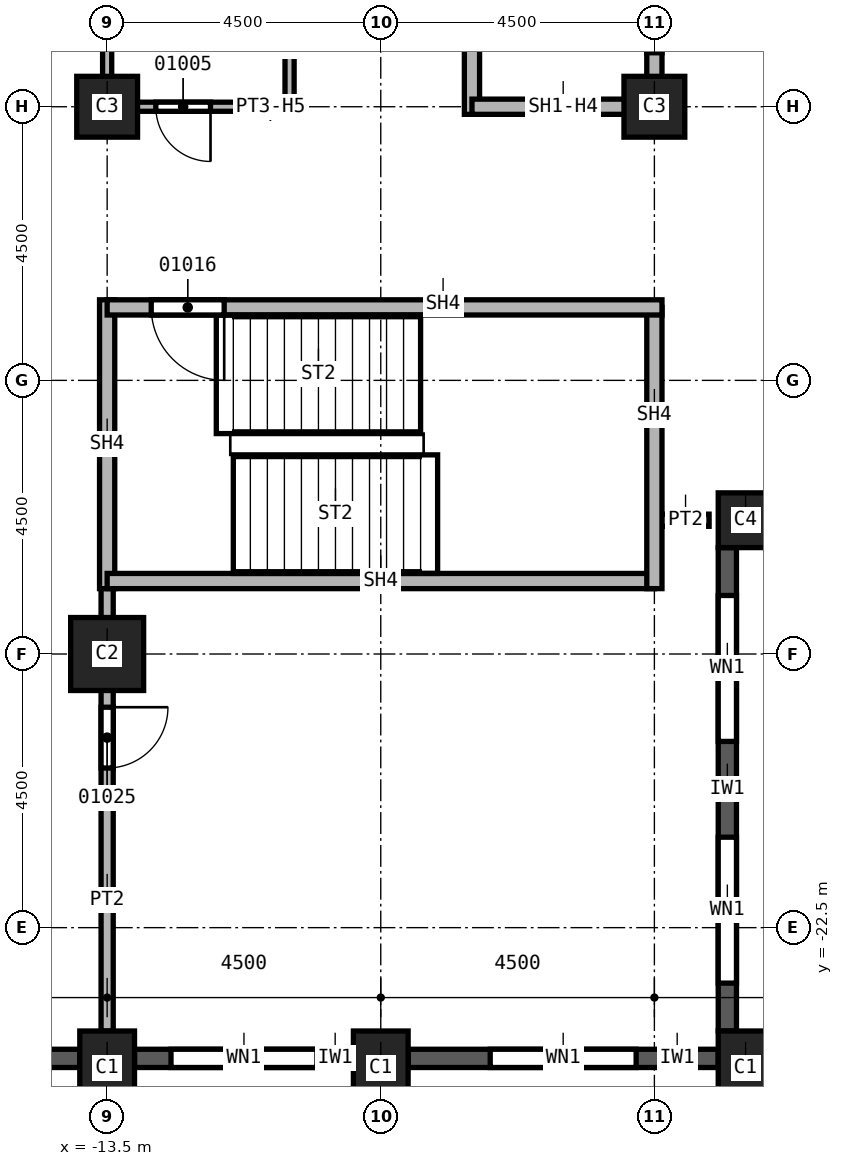
"""IFC4 building model, lengths in metres.
Left out: names, types, materials, properties, quantities, classifications, styles, units other than length and angle.
Written with IfcOpenShell. Run it as: python <this file> out.ifc"""

import sys

from ifc_helpers import new_model, si_unit, direction, frame, frame_2d, origin, origin_2d, place, context, subcontext, project, spatial, rectangle, extrude, element, fill, save


model = new_model("IFC4")
c1 = context("Model", 3, precision=1e-05, world=origin(), true_north=direction((0.0, 1.0)))
c2 = subcontext(c1, "Body", "Model", "MODEL_VIEW")
j1 = project(units=[si_unit("LENGTHUNIT", "METRE"), si_unit("PLANEANGLEUNIT", "RADIAN")], contexts=[c1])
p1 = place(None, origin())
s1 = spatial("IfcSite", under=j1, at=p1, CompositionType="ELEMENT")
p2 = place(p1, origin())
s2 = spatial("IfcBuilding", under=s1, at=p2, CompositionType="ELEMENT")
p3 = place(p2, frame((0.0, 0.0, 72.0)))
s3 = spatial("IfcBuildingStorey", under=s2, at=p3, CompositionType="ELEMENT", Elevation=72.0)
p4 = place(p3, frame((-13.5, -18.0, 0.0), z_axis=(0.0, 0.0, 1.0), x_axis=(1.0, 0.0, 0.0)))
e1 = element("IfcColumn", 1, at=p4, inside=s3, PredefinedType="COLUMN", context=c2, shape_type="SweptSolid", body=[
    extrude(rectangle(XDim=1.2, YDim=1.2, at=origin_2d()), origin(), (0.0, 0.0, 1.0), 3.7),
])
for number, where, z_axis, x_axis in (
    (2, (-4.5, -9.0, 0.0), (0.0, 0.0, 1.0), (1.0, 0.0, 0.0)),
    (3, (-13.5, -9.0, 0.0), (0.0, 0.0, 1.0), (1.0, 0.0, 0.0)),
):
    element("IfcColumn", number, at=place(p3, frame(where, z_axis=z_axis, x_axis=x_axis)), inside=s3, PredefinedType="COLUMN", context=c2, shape_type="SweptSolid", body=[
        extrude(rectangle(XDim=1.0, YDim=1.0, at=origin_2d()), origin(), (0.0, 0.0, 1.0), 3.7),
    ])
for number, where, z_axis, x_axis in (
    (4, (-3.0, -24.8, 0.0), (0.0, 0.0, 1.0), (1.0, 0.0, 0.0)),
    (5, (-9.0, -24.8, 0.0), (0.0, 0.0, 1.0), (1.0, 0.0, 0.0)),
    (6, (-13.5, -24.8, 0.0), (0.0, 0.0, 1.0), (1.0, 0.0, 0.0)),
):
    element("IfcColumn", number, at=place(p3, frame(where, z_axis=z_axis, x_axis=x_axis)), inside=s3, PredefinedType="COLUMN", context=c2, shape_type="SweptSolid", body=[
        extrude(rectangle(XDim=0.9, YDim=1.2, at=origin_2d()), origin(), (0.0, 0.0, 1.0), 3.7),
    ])
p5 = place(p3, frame((-3.0, -15.8, 0.0), z_axis=(0.0, 0.0, 1.0), x_axis=(1.0, 0.0, 0.0)))
e7 = element("IfcColumn", 7, at=p5, inside=s3, PredefinedType="COLUMN", context=c2, shape_type="SweptSolid", body=[
    extrude(rectangle(XDim=0.9, YDim=0.9, at=origin_2d()), origin(), (0.0, 0.0, 1.0), 3.7),
])
p6 = place(p3, frame((-17.55, -24.65, 0.0), z_axis=(0.0, 0.0, 1.0), x_axis=(1.0, 0.0, 0.0)))
e8 = element("IfcWall", 8, at=p6, inside=s3, PredefinedType="SOLIDWALL", context=c2, shape_type="SweptSolid", body=[
    extrude(rectangle(XDim=3.6, YDim=0.3, at=frame_2d((1.8, 0.0))), origin(), (0.0, 0.0, 1.0), 3.1),
])
p7 = place(p6, frame((0.775, 0.0, 0.8)))
e9 = element("IfcOpeningElement", 9, at=p7, cuts=e8, PredefinedType="OPENING", context=c2, shape_type="SweptSolid", body=[
    extrude(rectangle(XDim=1.0, YDim=1.95, at=frame_2d((0.5, 0.975))), frame((0.0, 0.15, 0.0), z_axis=(0.0, -1.0, 0.0), x_axis=(1.0, 0.0, 0.0)), (0.0, 0.0, 1.0), 0.3),
])
p8 = place(p6, frame((2.375, 0.0, 0.8)))
e10 = element("IfcOpeningElement", 10, at=p8, cuts=e8, PredefinedType="OPENING", context=c2, shape_type="SweptSolid", body=[
    extrude(rectangle(XDim=0.6, YDim=1.95, at=frame_2d((0.3, 0.975))), frame((0.0, 0.15, 0.0), z_axis=(0.0, -1.0, 0.0), x_axis=(1.0, 0.0, 0.0)), (0.0, 0.0, 1.0), 0.3),
])
p9 = place(p3, frame((-13.05, -24.65, 0.0), z_axis=(0.0, 0.0, 1.0), x_axis=(1.0, 0.0, 0.0)))
e11 = element("IfcWall", 11, at=p9, inside=s3, PredefinedType="SOLIDWALL", context=c2, shape_type="SweptSolid", body=[
    extrude(rectangle(XDim=3.6, YDim=0.3, at=frame_2d((1.8, 0.0))), origin(), (0.0, 0.0, 1.0), 3.1),
])
p10 = place(p9, frame((0.6, 0.0, 0.8)))
e12 = element("IfcOpeningElement", 12, at=p10, cuts=e11, PredefinedType="OPENING", context=c2, shape_type="SweptSolid", body=[
    extrude(rectangle(XDim=2.4, YDim=1.95, at=frame_2d((1.2, 0.975))), frame((0.0, 0.15, 0.0), z_axis=(0.0, -1.0, 0.0), x_axis=(1.0, 0.0, 0.0)), (0.0, 0.0, 1.0), 0.3),
])
p11 = place(p3, frame((-8.55, -24.65, 0.0), z_axis=(0.0, 0.0, 1.0), x_axis=(1.0, 0.0, 0.0)))
e13 = element("IfcWall", 13, at=p11, inside=s3, PredefinedType="SOLIDWALL", context=c2, shape_type="SweptSolid", body=[
    extrude(rectangle(XDim=5.1, YDim=0.3, at=frame_2d((2.55, 0.0))), origin(), (0.0, 0.0, 1.0), 3.1),
])
p12 = place(p11, frame((1.35, 0.0, 0.8)))
e14 = element("IfcOpeningElement", 14, at=p12, cuts=e13, PredefinedType="OPENING", context=c2, shape_type="SweptSolid", body=[
    extrude(rectangle(XDim=2.4, YDim=1.95, at=frame_2d((1.2, 0.975))), frame((0.0, 0.15, 0.0), z_axis=(0.0, -1.0, 0.0), x_axis=(1.0, 0.0, 0.0)), (0.0, 0.0, 1.0), 0.3),
])
p13 = place(p3, frame((-3.3, -24.2, 0.0), z_axis=(0.0, 0.0, 1.0), x_axis=(0.0, 1.0, 0.0)))
e15 = element("IfcWall", 15, at=p13, inside=s3, PredefinedType="SOLIDWALL", context=c2, shape_type="SweptSolid", body=[
    extrude(rectangle(XDim=7.95, YDim=0.3, at=frame_2d((3.975, 0.0))), origin(), (0.0, 0.0, 1.0), 3.1),
])
p14 = place(p13, frame((0.788, 0.0, 0.8)))
e16 = element("IfcOpeningElement", 16, at=p14, cuts=e15, PredefinedType="OPENING", context=c2, shape_type="SweptSolid", body=[
    extrude(rectangle(XDim=2.4, YDim=1.95, at=frame_2d((1.2, 0.975))), frame((0.0, 0.15, 0.0), z_axis=(0.0, -1.0, 0.0), x_axis=(1.0, 0.0, 0.0)), (0.0, 0.0, 1.0), 0.3),
])
p15 = place(p13, frame((4.762, 0.0, 0.8)))
e17 = element("IfcOpeningElement", 17, at=p15, cuts=e15, PredefinedType="OPENING", context=c2, shape_type="SweptSolid", body=[
    extrude(rectangle(XDim=2.4, YDim=1.95, at=frame_2d((1.2, 0.975))), frame((0.0, 0.15, 0.0), z_axis=(0.0, -1.0, 0.0), x_axis=(1.0, 0.0, 0.0)), (0.0, 0.0, 1.0), 0.3),
])
p16 = place(p3, frame((-13.5, -16.675, 0.0), z_axis=(0.0, 0.0, 1.0), x_axis=(0.0, -1.0, 0.0)))
e18 = element("IfcWall", 18, at=p16, inside=s3, PredefinedType="PARTITIONING", context=c2, shape_type="SweptSolid", body=[
    extrude(rectangle(XDim=7.525, YDim=0.2, at=frame_2d((3.762, 0.0))), origin(), (0.0, 0.0, 1.0), 3.7),
])
p17 = place(p16, frame((2.2, 0.0, 0.0)))
e19 = element("IfcOpeningElement", 19, at=p17, cuts=e18, PredefinedType="OPENING", context=c2, shape_type="SweptSolid", body=[
    extrude(rectangle(XDim=1.0, YDim=2.1, at=frame_2d((0.5, 1.05))), frame((0.0, 0.1, 0.0), z_axis=(0.0, -1.0, 0.0), x_axis=(1.0, 0.0, 0.0)), (0.0, 0.0, 1.0), 0.2),
])
p18 = place(p3, frame((-3.6, -15.8, 0.0), z_axis=(0.0, 0.0, 1.0), x_axis=(-1.0, 0.0, 0.0)))
e20 = element("IfcWall", 20, at=p18, inside=s3, PredefinedType="PARTITIONING", context=c2, shape_type="SweptSolid", body=[
    extrude(rectangle(XDim=0.9, YDim=0.2, at=frame_2d((0.45, 0.0))), origin(), (0.0, 0.0, 1.0), 3.7),
])
p19 = place(p3, frame((-7.5, -9.125, 0.0), z_axis=(0.0, 0.0, 1.0), x_axis=(0.0, 1.0, 0.0)))
e21 = element("IfcWall", 21, at=p19, inside=s3, PredefinedType="SOLIDWALL", context=c2, shape_type="SweptSolid", body=[
    extrude(rectangle(XDim=12.25, YDim=0.25, at=frame_2d((6.125, 0.0))), origin(), (0.0, 0.0, 1.0), 3.7),
])
p20 = place(p3, frame((-4.5, -9.0, 0.0), z_axis=(0.0, 0.0, 1.0), x_axis=(-1.0, 0.0, 0.0)))
e22 = element("IfcWall", 22, at=p20, inside=s3, PredefinedType="SOLIDWALL", context=c2, shape_type="SweptSolid", body=[
    extrude(rectangle(XDim=3.0, YDim=0.25, at=frame_2d((1.5, 0.0))), origin(), (0.0, 0.0, 1.0), 2.938),
])
p21 = place(p3, frame((-4.5, 0.0, 0.0), z_axis=(0.0, 0.0, 1.0), x_axis=(0.0, -1.0, 0.0)))
e23 = element("IfcWall", 23, at=p21, inside=s3, PredefinedType="SOLIDWALL", context=c2, shape_type="SweptSolid", body=[
    extrude(rectangle(XDim=9.125, YDim=0.25, at=frame_2d((4.562, 0.0))), origin(), (0.0, 0.0, 1.0), 2.938),
])
p22 = place(p21, frame((7.012, 0.0, 0.0)))
e24 = element("IfcOpeningElement", 24, at=p22, cuts=e23, PredefinedType="OPENING", context=c2, shape_type="SweptSolid", body=[
    extrude(rectangle(XDim=1.1, YDim=2.1, at=frame_2d((0.55, 1.05))), frame((0.0, 0.125, 0.0), z_axis=(0.0, -1.0, 0.0), x_axis=(1.0, 0.0, 0.0)), (0.0, 0.0, 1.0), 0.25),
])
p23 = place(p21, frame((3.95, 0.0, 0.0)))
e25 = element("IfcOpeningElement", 25, at=p23, cuts=e23, PredefinedType="OPENING", context=c2, shape_type="SweptSolid", body=[
    extrude(rectangle(XDim=1.1, YDim=2.1, at=frame_2d((0.55, 1.05))), frame((0.0, 0.125, 0.0), z_axis=(0.0, -1.0, 0.0), x_axis=(1.0, 0.0, 0.0)), (0.0, 0.0, 1.0), 0.25),
])
p24 = place(p21, frame((0.95, 0.0, 0.0)))
e26 = element("IfcOpeningElement", 26, at=p24, cuts=e23, PredefinedType="OPENING", context=c2, shape_type="SweptSolid", body=[
    extrude(rectangle(XDim=1.1, YDim=2.1, at=frame_2d((0.55, 1.05))), frame((0.0, 0.125, 0.0), z_axis=(0.0, -1.0, 0.0), x_axis=(1.0, 0.0, 0.0)), (0.0, 0.0, 1.0), 0.25),
])
p25 = place(p3, frame((-13.5, -12.175, 0.0), z_axis=(0.0, 0.0, 1.0), x_axis=(0.0, -1.0, 0.0)))
e27 = element("IfcWall", 27, at=p25, inside=s3, PredefinedType="SOLIDWALL", context=c2, shape_type="SweptSolid", body=[
    extrude(rectangle(XDim=4.75, YDim=0.25, at=frame_2d((2.375, 0.0))), origin(), (0.0, 0.0, 1.0), 3.7),
])
p26 = place(p3, frame((-4.5, -16.8, 0.0), z_axis=(0.0, 0.0, 1.0), x_axis=(-1.0, 0.0, 0.0)))
e28 = element("IfcWall", 28, at=p26, inside=s3, PredefinedType="SOLIDWALL", context=c2, shape_type="SweptSolid", body=[
    extrude(rectangle(XDim=9.0, YDim=0.25, at=frame_2d((4.5, 0.0))), origin(), (0.0, 0.0, 1.0), 3.7),
])
p27 = place(p3, frame((-4.5, -12.3, 0.0), z_axis=(0.0, 0.0, 1.0), x_axis=(0.0, -1.0, 0.0)))
e29 = element("IfcWall", 29, at=p27, inside=s3, PredefinedType="SOLIDWALL", context=c2, shape_type="SweptSolid", body=[
    extrude(rectangle(XDim=4.625, YDim=0.25, at=frame_2d((2.312, 0.0))), origin(), (0.0, 0.0, 1.0), 3.7),
])
p28 = place(p3, frame((-4.375, -12.3, 0.0), z_axis=(0.0, 0.0, 1.0), x_axis=(-1.0, 0.0, 0.0)))
e30 = element("IfcWall", 30, at=p28, inside=s3, PredefinedType="SOLIDWALL", context=c2, shape_type="SweptSolid", body=[
    extrude(rectangle(XDim=9.125, YDim=0.25, at=frame_2d((4.562, 0.0))), origin(), (0.0, 0.0, 1.0), 3.7),
])
p29 = place(p28, frame((7.2, 0.0, 0.0)))
e31 = element("IfcOpeningElement", 31, at=p29, cuts=e30, PredefinedType="OPENING", context=c2, shape_type="SweptSolid", body=[
    extrude(rectangle(XDim=1.2, YDim=2.1, at=frame_2d((0.6, 1.05))), frame((0.0, 0.125, 0.0), z_axis=(0.0, -1.0, 0.0), x_axis=(1.0, 0.0, 0.0)), (0.0, 0.0, 1.0), 0.25),
])
p30 = place(p3, frame((-13.5, -9.075, 0.0), z_axis=(0.0, 0.0, 1.0), x_axis=(0.0, 1.0, 0.0)))
e32 = element("IfcWall", 32, at=p30, inside=s3, PredefinedType="PARTITIONING", context=c2, shape_type="SweptSolid", body=[
    extrude(rectangle(XDim=2.075, YDim=0.15, at=frame_2d((1.038, 0.0))), origin(), (0.0, 0.0, 1.0), 2.938),
])
p31 = place(p3, frame((-10.5, -9.075, 0.0), z_axis=(0.0, 0.0, 1.0), x_axis=(0.0, 1.0, 0.0)))
e33 = element("IfcWall", 33, at=p31, inside=s3, PredefinedType="PARTITIONING", context=c2, shape_type="SweptSolid", body=[
    extrude(rectangle(XDim=2.15, YDim=0.15, at=frame_2d((1.075, 0.0))), origin(), (0.0, 0.0, 1.0), 3.7),
])
p32 = place(p3, frame((-10.5, -9.0, 0.0), z_axis=(0.0, 0.0, 1.0), x_axis=(-1.0, 0.0, 0.0)))
e34 = element("IfcWall", 34, at=p32, inside=s3, PredefinedType="PARTITIONING", context=c2, shape_type="SweptSolid", body=[
    extrude(rectangle(XDim=3.0, YDim=0.15, at=frame_2d((1.5, 0.0))), origin(), (0.0, 0.0, 1.0), 2.938),
])
p33 = place(p32, frame((1.3, 0.0, 0.0)))
e35 = element("IfcOpeningElement", 35, at=p33, cuts=e34, PredefinedType="OPENING", context=c2, shape_type="SweptSolid", body=[
    extrude(rectangle(XDim=0.9, YDim=2.1, at=frame_2d((0.45, 1.05))), frame((0.0, 0.075, 0.0), z_axis=(0.0, -1.0, 0.0), x_axis=(1.0, 0.0, 0.0)), (0.0, 0.0, 1.0), 0.15),
])
p34 = place(p10, origin())
e36 = element("IfcWindow", 36, at=p34, inside=s3, PartitioningType="SINGLE_PANEL", PredefinedType="WINDOW", context=c2, shape_type="SweptSolid", body=[
    extrude(rectangle(XDim=2.4, YDim=1.95, at=frame_2d((1.2, 0.975))), frame((0.0, 0.03, 0.0), z_axis=(0.0, -1.0, 0.0), x_axis=(1.0, 0.0, 0.0)), (0.0, 0.0, 1.0), 0.06),
])
fill(e12, e36)
p35 = place(p12, origin())
e37 = element("IfcWindow", 37, at=p35, inside=s3, PartitioningType="SINGLE_PANEL", PredefinedType="WINDOW", context=c2, shape_type="SweptSolid", body=[
    extrude(rectangle(XDim=2.4, YDim=1.95, at=frame_2d((1.2, 0.975))), frame((0.0, 0.03, 0.0), z_axis=(0.0, -1.0, 0.0), x_axis=(1.0, 0.0, 0.0)), (0.0, 0.0, 1.0), 0.06),
])
fill(e14, e37)
p36 = place(p14, origin())
e38 = element("IfcWindow", 38, at=p36, inside=s3, PartitioningType="SINGLE_PANEL", PredefinedType="WINDOW", context=c2, shape_type="SweptSolid", body=[
    extrude(rectangle(XDim=2.4, YDim=1.95, at=frame_2d((1.2, 0.975))), frame((0.0, 0.03, 0.0), z_axis=(0.0, -1.0, 0.0), x_axis=(1.0, 0.0, 0.0)), (0.0, 0.0, 1.0), 0.06),
])
fill(e16, e38)
p37 = place(p15, origin())
e39 = element("IfcWindow", 39, at=p37, inside=s3, PartitioningType="SINGLE_PANEL", PredefinedType="WINDOW", context=c2, shape_type="SweptSolid", body=[
    extrude(rectangle(XDim=2.4, YDim=1.95, at=frame_2d((1.2, 0.975))), frame((0.0, 0.03, 0.0), z_axis=(0.0, -1.0, 0.0), x_axis=(1.0, 0.0, 0.0)), (0.0, 0.0, 1.0), 0.06),
])
fill(e17, e39)
p38 = place(p33, origin())
e40 = element("IfcDoor", 40, at=p38, inside=s3, OperationType="SINGLE_SWING_RIGHT", PredefinedType="DOOR", context=c2, shape_type="SweptSolid", body=[
    extrude(rectangle(XDim=0.9, YDim=2.1, at=frame_2d((0.45, 1.05))), frame((0.0, 0.025, 0.0), z_axis=(0.0, -1.0, 0.0), x_axis=(1.0, 0.0, 0.0)), (0.0, 0.0, 1.0), 0.05),
])
fill(e35, e40)
p39 = place(p29, origin())
e41 = element("IfcDoor", 41, at=p39, inside=s3, OperationType="SINGLE_SWING_LEFT", PredefinedType="DOOR", context=c2, shape_type="SweptSolid", body=[
    extrude(rectangle(XDim=1.2, YDim=2.1, at=frame_2d((0.6, 1.05))), frame((0.0, 0.025, 0.0), z_axis=(0.0, -1.0, 0.0), x_axis=(1.0, 0.0, 0.0)), (0.0, 0.0, 1.0), 0.05),
])
fill(e31, e41)
p40 = place(p17, origin())
e42 = element("IfcDoor", 42, at=p40, inside=s3, OperationType="SINGLE_SWING_RIGHT", PredefinedType="DOOR", context=c2, shape_type="SweptSolid", body=[
    extrude(rectangle(XDim=1.0, YDim=2.1, at=frame_2d((0.5, 1.05))), frame((0.0, 0.025, 0.0), z_axis=(0.0, -1.0, 0.0), x_axis=(1.0, 0.0, 0.0)), (0.0, 0.0, 1.0), 0.05),
])
fill(e19, e42)
p41 = place(p22, origin())
e43 = element("IfcDoor", 43, at=p41, inside=s3, OperationType="SLIDING_TO_LEFT", PredefinedType="DOOR", context=c2, shape_type="SweptSolid", body=[
    extrude(rectangle(XDim=1.1, YDim=2.1, at=frame_2d((0.55, 1.05))), frame((0.0, 0.025, 0.0), z_axis=(0.0, -1.0, 0.0), x_axis=(1.0, 0.0, 0.0)), (0.0, 0.0, 1.0), 0.05),
])
fill(e24, e43)
save(model, sys.argv[1])
